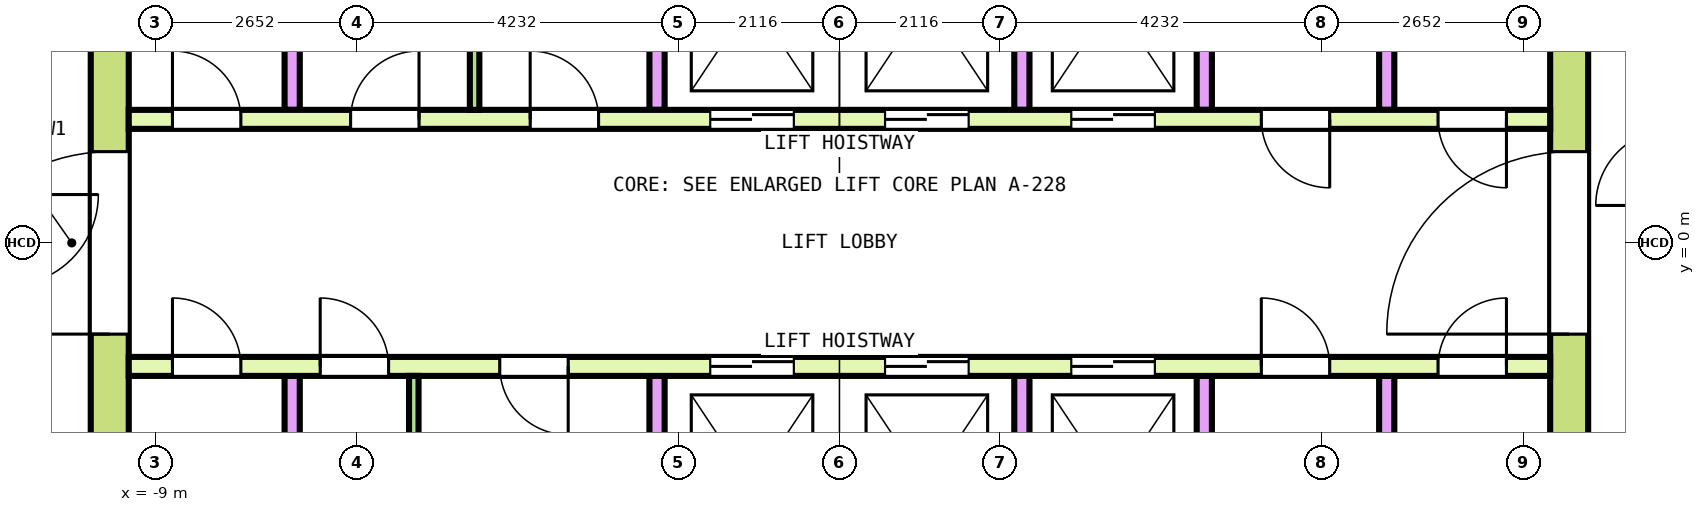
"""IFC4 building model, lengths in metres.
Left out: names, types, materials, properties, quantities, classifications, styles, units other than length and angle.
Written with IfcOpenShell. Run it as: python <this file> out.ifc"""

import sys

from ifc_helpers import new_model, si_unit, direction, frame, frame_2d, origin, place, context, subcontext, project, spatial, rectangle, extrude, element, fill, save


model = new_model("IFC4")
c1 = context("Model", 3, precision=1e-05, world=origin(), true_north=direction((0.0, 1.0)))
c2 = subcontext(c1, "Body", "Model", "MODEL_VIEW")
j1 = project(units=[si_unit("LENGTHUNIT", "METRE"), si_unit("PLANEANGLEUNIT", "RADIAN")], contexts=[c1])
p1 = place(None, origin())
s1 = spatial("IfcSite", under=j1, at=p1, CompositionType="ELEMENT")
p2 = place(p1, origin())
s2 = spatial("IfcBuilding", under=s1, at=p2, CompositionType="ELEMENT")
p3 = place(p2, frame((0.0, 0.0, 324.6)))
s3 = spatial("IfcBuildingStorey", under=s2, at=p3, CompositionType="ELEMENT", Elevation=324.6)
p4 = place(p3, frame((-9.6, -7.85, 0.0), z_axis=(0.0, 0.0, 1.0), x_axis=(0.0, 1.0, 0.0)))
e1 = element("IfcWall", 1, at=p4, inside=s3, PredefinedType="SHEAR", context=c2, shape_type="SweptSolid", body=[
    extrude(rectangle(XDim=15.7, YDim=0.5, at=frame_2d((7.85, 0.0))), origin(), (0.0, 0.0, 1.0), 3.7),
])
p5 = place(p4, frame((6.65, 0.0, 0.0)))
e2 = element("IfcOpeningElement", 2, at=p5, cuts=e1, PredefinedType="OPENING", context=c2, shape_type="SweptSolid", body=[
    extrude(rectangle(XDim=2.4, YDim=2.1, at=frame_2d((1.2, 1.05))), frame((0.0, 0.26, 0.0), z_axis=(0.0, -1.0, 0.0), x_axis=(1.0, 0.0, 0.0)), (0.0, 0.0, 1.0), 0.52),
])
p6 = place(p4, frame((13.55, 0.0, 0.0)))
e3 = element("IfcOpeningElement", 3, at=p6, cuts=e1, PredefinedType="OPENING", context=c2, shape_type="SweptSolid", body=[
    extrude(rectangle(XDim=1.2, YDim=2.1, at=frame_2d((0.6, 1.05))), frame((0.0, 0.26, 0.0), z_axis=(0.0, -1.0, 0.0), x_axis=(1.0, 0.0, 0.0)), (0.0, 0.0, 1.0), 0.52),
])
p7 = place(p4, frame((0.95, 0.0, 0.0)))
e4 = element("IfcOpeningElement", 4, at=p7, cuts=e1, PredefinedType="OPENING", context=c2, shape_type="SweptSolid", body=[
    extrude(rectangle(XDim=1.2, YDim=2.1, at=frame_2d((0.6, 1.05))), frame((0.0, 0.26, 0.0), z_axis=(0.0, -1.0, 0.0), x_axis=(1.0, 0.0, 0.0)), (0.0, 0.0, 1.0), 0.52),
])
p8 = place(p3, frame((9.6, -7.85, 0.0), z_axis=(0.0, 0.0, 1.0), x_axis=(0.0, 1.0, 0.0)))
e5 = element("IfcWall", 5, at=p8, inside=s3, PredefinedType="SHEAR", context=c2, shape_type="SweptSolid", body=[
    extrude(rectangle(XDim=15.7, YDim=0.5, at=frame_2d((7.85, 0.0))), origin(), (0.0, 0.0, 1.0), 3.7),
])
p9 = place(p8, frame((6.65, 0.0, 0.0)))
e6 = element("IfcOpeningElement", 6, at=p9, cuts=e5, PredefinedType="OPENING", context=c2, shape_type="SweptSolid", body=[
    extrude(rectangle(XDim=2.4, YDim=2.1, at=frame_2d((1.2, 1.05))), frame((0.0, 0.26, 0.0), z_axis=(0.0, -1.0, 0.0), x_axis=(1.0, 0.0, 0.0)), (0.0, 0.0, 1.0), 0.52),
])
p10 = place(p8, frame((13.55, 0.0, 0.0)))
e7 = element("IfcOpeningElement", 7, at=p10, cuts=e5, PredefinedType="OPENING", context=c2, shape_type="SweptSolid", body=[
    extrude(rectangle(XDim=1.2, YDim=2.1, at=frame_2d((0.6, 1.05))), frame((0.0, 0.26, 0.0), z_axis=(0.0, -1.0, 0.0), x_axis=(1.0, 0.0, 0.0)), (0.0, 0.0, 1.0), 0.52),
])
p11 = place(p8, frame((1.05, 0.0, 0.0)))
e8 = element("IfcOpeningElement", 8, at=p11, cuts=e5, PredefinedType="OPENING", context=c2, shape_type="SweptSolid", body=[
    extrude(rectangle(XDim=1.0, YDim=2.1, at=frame_2d((0.5, 1.05))), frame((0.0, 0.26, 0.0), z_axis=(0.0, -1.0, 0.0), x_axis=(1.0, 0.0, 0.0)), (0.0, 0.0, 1.0), 0.52),
])
p12 = place(p3, frame((-9.35, 1.625, 0.0), z_axis=(0.0, 0.0, 1.0), x_axis=(1.0, 0.0, 0.0)))
e9 = element("IfcWall", 9, at=p12, inside=s3, PredefinedType="SOLIDWALL", context=c2, shape_type="SweptSolid", body=[
    extrude(rectangle(XDim=18.7, YDim=0.25, at=frame_2d((9.35, 0.0))), origin(), (0.0, 0.0, 1.0), 3.7),
])
p13 = place(p12, frame((7.65, 0.0, 0.0)))
e10 = element("IfcOpeningElement", 10, at=p13, cuts=e9, PredefinedType="OPENING", context=c2, shape_type="SweptSolid", body=[
    extrude(rectangle(XDim=1.1, YDim=2.1, at=frame_2d((0.55, 1.05))), frame((0.0, 0.135, 0.0), z_axis=(0.0, -1.0, 0.0), x_axis=(1.0, 0.0, 0.0)), (0.0, 0.0, 1.0), 0.27),
])
p14 = place(p12, frame((9.95, 0.0, 0.0)))
e11 = element("IfcOpeningElement", 11, at=p14, cuts=e9, PredefinedType="OPENING", context=c2, shape_type="SweptSolid", body=[
    extrude(rectangle(XDim=1.1, YDim=2.1, at=frame_2d((0.55, 1.05))), frame((0.0, 0.135, 0.0), z_axis=(0.0, -1.0, 0.0), x_axis=(1.0, 0.0, 0.0)), (0.0, 0.0, 1.0), 0.27),
])
p15 = place(p12, frame((12.4, 0.0, 0.0)))
e12 = element("IfcOpeningElement", 12, at=p15, cuts=e9, PredefinedType="OPENING", context=c2, shape_type="SweptSolid", body=[
    extrude(rectangle(XDim=1.1, YDim=2.1, at=frame_2d((0.55, 1.05))), frame((0.0, 0.135, 0.0), z_axis=(0.0, -1.0, 0.0), x_axis=(1.0, 0.0, 0.0)), (0.0, 0.0, 1.0), 0.27),
])
p16 = place(p12, frame((0.575, 0.0, 0.0)))
e13 = element("IfcOpeningElement", 13, at=p16, cuts=e9, PredefinedType="OPENING", context=c2, shape_type="SweptSolid", body=[
    extrude(rectangle(XDim=0.9, YDim=2.1, at=frame_2d((0.45, 1.05))), frame((0.0, 0.135, 0.0), z_axis=(0.0, -1.0, 0.0), x_axis=(1.0, 0.0, 0.0)), (0.0, 0.0, 1.0), 0.27),
])
p17 = place(p12, frame((2.919, 0.0, 0.0)))
e14 = element("IfcOpeningElement", 14, at=p17, cuts=e9, PredefinedType="OPENING", context=c2, shape_type="SweptSolid", body=[
    extrude(rectangle(XDim=0.9, YDim=2.1, at=frame_2d((0.45, 1.05))), frame((0.0, 0.135, 0.0), z_axis=(0.0, -1.0, 0.0), x_axis=(1.0, 0.0, 0.0)), (0.0, 0.0, 1.0), 0.27),
])
p18 = place(p12, frame((5.281, 0.0, 0.0)))
e15 = element("IfcOpeningElement", 15, at=p18, cuts=e9, PredefinedType="OPENING", context=c2, shape_type="SweptSolid", body=[
    extrude(rectangle(XDim=0.9, YDim=2.1, at=frame_2d((0.45, 1.05))), frame((0.0, 0.135, 0.0), z_axis=(0.0, -1.0, 0.0), x_axis=(1.0, 0.0, 0.0)), (0.0, 0.0, 1.0), 0.27),
])
p19 = place(p12, frame((14.9, 0.0, 0.0)))
e16 = element("IfcOpeningElement", 16, at=p19, cuts=e9, PredefinedType="OPENING", context=c2, shape_type="SweptSolid", body=[
    extrude(rectangle(XDim=0.9, YDim=2.1, at=frame_2d((0.45, 1.05))), frame((0.0, 0.135, 0.0), z_axis=(0.0, -1.0, 0.0), x_axis=(1.0, 0.0, 0.0)), (0.0, 0.0, 1.0), 0.27),
])
p20 = place(p12, frame((17.225, 0.0, 0.0)))
e17 = element("IfcOpeningElement", 17, at=p20, cuts=e9, PredefinedType="OPENING", context=c2, shape_type="SweptSolid", body=[
    extrude(rectangle(XDim=0.9, YDim=2.1, at=frame_2d((0.45, 1.05))), frame((0.0, 0.135, 0.0), z_axis=(0.0, -1.0, 0.0), x_axis=(1.0, 0.0, 0.0)), (0.0, 0.0, 1.0), 0.27),
])
for number, where, z_axis, x_axis in (
    (18, (-7.2, 1.75, 0.0), (0.0, 0.0, 1.0), (0.0, 1.0, 0.0)),
    (19, (-2.4, 1.75, 0.0), (0.0, 0.0, 1.0), (0.0, 1.0, 0.0)),
    (20, (2.4, 1.75, 0.0), (0.0, 0.0, 1.0), (0.0, 1.0, 0.0)),
    (21, (4.8, 1.75, 0.0), (0.0, 0.0, 1.0), (0.0, 1.0, 0.0)),
    (22, (7.2, 1.75, 0.0), (0.0, 0.0, 1.0), (0.0, 1.0, 0.0)),
):
    element("IfcWall", number, at=place(p3, frame(where, z_axis=z_axis, x_axis=x_axis)), inside=s3, PredefinedType="SOLIDWALL", context=c2, shape_type="SweptSolid", body=[
        extrude(rectangle(XDim=2.9, YDim=0.2, at=frame_2d((1.45, 0.0))), origin(), (0.0, 0.0, 1.0), 3.7),
    ])
p21 = place(p3, frame((-9.35, -1.625, 0.0), z_axis=(0.0, 0.0, 1.0), x_axis=(1.0, 0.0, 0.0)))
e23 = element("IfcWall", 23, at=p21, inside=s3, PredefinedType="SOLIDWALL", context=c2, shape_type="SweptSolid", body=[
    extrude(rectangle(XDim=18.7, YDim=0.25, at=frame_2d((9.35, 0.0))), origin(), (0.0, 0.0, 1.0), 3.7),
])
p22 = place(p21, frame((7.65, 0.0, 0.0)))
e24 = element("IfcOpeningElement", 24, at=p22, cuts=e23, PredefinedType="OPENING", context=c2, shape_type="SweptSolid", body=[
    extrude(rectangle(XDim=1.1, YDim=2.1, at=frame_2d((0.55, 1.05))), frame((0.0, 0.135, 0.0), z_axis=(0.0, -1.0, 0.0), x_axis=(1.0, 0.0, 0.0)), (0.0, 0.0, 1.0), 0.27),
])
p23 = place(p21, frame((9.95, 0.0, 0.0)))
e25 = element("IfcOpeningElement", 25, at=p23, cuts=e23, PredefinedType="OPENING", context=c2, shape_type="SweptSolid", body=[
    extrude(rectangle(XDim=1.1, YDim=2.1, at=frame_2d((0.55, 1.05))), frame((0.0, 0.135, 0.0), z_axis=(0.0, -1.0, 0.0), x_axis=(1.0, 0.0, 0.0)), (0.0, 0.0, 1.0), 0.27),
])
p24 = place(p21, frame((12.4, 0.0, 0.0)))
e26 = element("IfcOpeningElement", 26, at=p24, cuts=e23, PredefinedType="OPENING", context=c2, shape_type="SweptSolid", body=[
    extrude(rectangle(XDim=1.1, YDim=2.1, at=frame_2d((0.55, 1.05))), frame((0.0, 0.135, 0.0), z_axis=(0.0, -1.0, 0.0), x_axis=(1.0, 0.0, 0.0)), (0.0, 0.0, 1.0), 0.27),
])
p25 = place(p21, frame((0.575, 0.0, 0.0)))
e27 = element("IfcOpeningElement", 27, at=p25, cuts=e23, PredefinedType="OPENING", context=c2, shape_type="SweptSolid", body=[
    extrude(rectangle(XDim=0.9, YDim=2.1, at=frame_2d((0.45, 1.05))), frame((0.0, 0.135, 0.0), z_axis=(0.0, -1.0, 0.0), x_axis=(1.0, 0.0, 0.0)), (0.0, 0.0, 1.0), 0.27),
])
p26 = place(p21, frame((2.519, 0.0, 0.0)))
e28 = element("IfcOpeningElement", 28, at=p26, cuts=e23, PredefinedType="OPENING", context=c2, shape_type="SweptSolid", body=[
    extrude(rectangle(XDim=0.9, YDim=2.1, at=frame_2d((0.45, 1.05))), frame((0.0, 0.135, 0.0), z_axis=(0.0, -1.0, 0.0), x_axis=(1.0, 0.0, 0.0)), (0.0, 0.0, 1.0), 0.27),
])
p27 = place(p21, frame((4.881, 0.0, 0.0)))
e29 = element("IfcOpeningElement", 29, at=p27, cuts=e23, PredefinedType="OPENING", context=c2, shape_type="SweptSolid", body=[
    extrude(rectangle(XDim=0.9, YDim=2.1, at=frame_2d((0.45, 1.05))), frame((0.0, 0.135, 0.0), z_axis=(0.0, -1.0, 0.0), x_axis=(1.0, 0.0, 0.0)), (0.0, 0.0, 1.0), 0.27),
])
p28 = place(p21, frame((14.9, 0.0, 0.0)))
e30 = element("IfcOpeningElement", 30, at=p28, cuts=e23, PredefinedType="OPENING", context=c2, shape_type="SweptSolid", body=[
    extrude(rectangle(XDim=0.9, YDim=2.1, at=frame_2d((0.45, 1.05))), frame((0.0, 0.135, 0.0), z_axis=(0.0, -1.0, 0.0), x_axis=(1.0, 0.0, 0.0)), (0.0, 0.0, 1.0), 0.27),
])
p29 = place(p21, frame((17.225, 0.0, 0.0)))
e31 = element("IfcOpeningElement", 31, at=p29, cuts=e23, PredefinedType="OPENING", context=c2, shape_type="SweptSolid", body=[
    extrude(rectangle(XDim=0.9, YDim=2.1, at=frame_2d((0.45, 1.05))), frame((0.0, 0.135, 0.0), z_axis=(0.0, -1.0, 0.0), x_axis=(1.0, 0.0, 0.0)), (0.0, 0.0, 1.0), 0.27),
])
for number, where, z_axis, x_axis in (
    (32, (-7.2, -4.65, 0.0), (0.0, 0.0, 1.0), (0.0, 1.0, 0.0)),
    (33, (-2.4, -4.65, 0.0), (0.0, 0.0, 1.0), (0.0, 1.0, 0.0)),
    (34, (2.4, -4.65, 0.0), (0.0, 0.0, 1.0), (0.0, 1.0, 0.0)),
    (35, (4.8, -4.65, 0.0), (0.0, 0.0, 1.0), (0.0, 1.0, 0.0)),
    (36, (7.2, -4.65, 0.0), (0.0, 0.0, 1.0), (0.0, 1.0, 0.0)),
):
    element("IfcWall", number, at=place(p3, frame(where, z_axis=z_axis, x_axis=x_axis)), inside=s3, PredefinedType="SOLIDWALL", context=c2, shape_type="SweptSolid", body=[
        extrude(rectangle(XDim=2.9, YDim=0.2, at=frame_2d((1.45, 0.0))), origin(), (0.0, 0.0, 1.0), 3.7),
    ])
for number, where, z_axis, x_axis in (
    (37, (-4.8, 1.75, 0.0), (0.0, 0.0, 1.0), (0.0, 1.0, 0.0)),
    (38, (-5.6, -4.65, 0.0), (0.0, 0.0, 1.0), (0.0, 1.0, 0.0)),
):
    element("IfcWall", number, at=place(p3, frame(where, z_axis=z_axis, x_axis=x_axis)), inside=s3, PredefinedType="PARTITIONING", context=c2, shape_type="SweptSolid", body=[
        extrude(rectangle(XDim=2.9, YDim=0.125, at=frame_2d((1.45, 0.0))), origin(), (0.0, 0.0, 1.0), 3.7),
    ])
p30 = place(p13, origin())
e39 = element("IfcDoor", 39, at=p30, inside=s3, OperationType="DOUBLE_DOOR_SLIDING", PredefinedType="DOOR", context=c2, shape_type="SweptSolid", body=[
    extrude(rectangle(XDim=1.1, YDim=2.1, at=frame_2d((0.55, 1.05))), frame((0.0, 0.075, 0.0), z_axis=(0.0, -1.0, 0.0), x_axis=(1.0, 0.0, 0.0)), (0.0, 0.0, 1.0), 0.15),
])
fill(e10, e39)
p31 = place(p14, origin())
e40 = element("IfcDoor", 40, at=p31, inside=s3, OperationType="DOUBLE_DOOR_SLIDING", PredefinedType="DOOR", context=c2, shape_type="SweptSolid", body=[
    extrude(rectangle(XDim=1.1, YDim=2.1, at=frame_2d((0.55, 1.05))), frame((0.0, 0.075, 0.0), z_axis=(0.0, -1.0, 0.0), x_axis=(1.0, 0.0, 0.0)), (0.0, 0.0, 1.0), 0.15),
])
fill(e11, e40)
p32 = place(p15, origin())
e41 = element("IfcDoor", 41, at=p32, inside=s3, OperationType="DOUBLE_DOOR_SLIDING", PredefinedType="DOOR", context=c2, shape_type="SweptSolid", body=[
    extrude(rectangle(XDim=1.1, YDim=2.1, at=frame_2d((0.55, 1.05))), frame((0.0, 0.075, 0.0), z_axis=(0.0, -1.0, 0.0), x_axis=(1.0, 0.0, 0.0)), (0.0, 0.0, 1.0), 0.15),
])
fill(e12, e41)
p33 = place(p22, origin())
e42 = element("IfcDoor", 42, at=p33, inside=s3, OperationType="DOUBLE_DOOR_SLIDING", PredefinedType="DOOR", context=c2, shape_type="SweptSolid", body=[
    extrude(rectangle(XDim=1.1, YDim=2.1, at=frame_2d((0.55, 1.05))), frame((0.0, 0.075, 0.0), z_axis=(0.0, -1.0, 0.0), x_axis=(1.0, 0.0, 0.0)), (0.0, 0.0, 1.0), 0.15),
])
fill(e24, e42)
p34 = place(p23, origin())
e43 = element("IfcDoor", 43, at=p34, inside=s3, OperationType="DOUBLE_DOOR_SLIDING", PredefinedType="DOOR", context=c2, shape_type="SweptSolid", body=[
    extrude(rectangle(XDim=1.1, YDim=2.1, at=frame_2d((0.55, 1.05))), frame((0.0, 0.075, 0.0), z_axis=(0.0, -1.0, 0.0), x_axis=(1.0, 0.0, 0.0)), (0.0, 0.0, 1.0), 0.15),
])
fill(e25, e43)
p35 = place(p24, origin())
e44 = element("IfcDoor", 44, at=p35, inside=s3, OperationType="DOUBLE_DOOR_SLIDING", PredefinedType="DOOR", context=c2, shape_type="SweptSolid", body=[
    extrude(rectangle(XDim=1.1, YDim=2.1, at=frame_2d((0.55, 1.05))), frame((0.0, 0.075, 0.0), z_axis=(0.0, -1.0, 0.0), x_axis=(1.0, 0.0, 0.0)), (0.0, 0.0, 1.0), 0.15),
])
fill(e26, e44)
p36 = place(p5, origin())
e45 = element("IfcDoor", 45, at=p36, inside=s3, OperationType="DOUBLE_DOOR_SINGLE_SWING", PredefinedType="DOOR", context=c2, shape_type="SweptSolid", body=[
    extrude(rectangle(XDim=2.4, YDim=2.1, at=frame_2d((1.2, 1.05))), frame((0.0, 0.2, 0.0), z_axis=(0.0, -1.0, 0.0), x_axis=(1.0, 0.0, 0.0)), (0.0, 0.0, 1.0), 0.4),
])
fill(e2, e45)
p37 = place(p9, origin())
e46 = element("IfcDoor", 46, at=p37, inside=s3, OperationType="DOUBLE_DOOR_SINGLE_SWING", PredefinedType="DOOR", context=c2, shape_type="SweptSolid", body=[
    extrude(rectangle(XDim=2.4, YDim=2.1, at=frame_2d((1.2, 1.05))), frame((0.0, 0.2, 0.0), z_axis=(0.0, -1.0, 0.0), x_axis=(1.0, 0.0, 0.0)), (0.0, 0.0, 1.0), 0.4),
])
fill(e6, e46)
p38 = place(p16, origin())
e47 = element("IfcDoor", 47, at=p38, inside=s3, OperationType="SINGLE_SWING_RIGHT", PredefinedType="DOOR", context=c2, shape_type="SweptSolid", body=[
    extrude(rectangle(XDim=0.9, YDim=2.1, at=frame_2d((0.45, 1.05))), frame((0.0, 0.075, 0.0), z_axis=(0.0, -1.0, 0.0), x_axis=(1.0, 0.0, 0.0)), (0.0, 0.0, 1.0), 0.15),
])
fill(e13, e47)
p39 = place(p17, origin())
e48 = element("IfcDoor", 48, at=p39, inside=s3, OperationType="SINGLE_SWING_LEFT", PredefinedType="DOOR", context=c2, shape_type="SweptSolid", body=[
    extrude(rectangle(XDim=0.9, YDim=2.1, at=frame_2d((0.45, 1.05))), frame((0.0, 0.075, 0.0), z_axis=(0.0, -1.0, 0.0), x_axis=(1.0, 0.0, 0.0)), (0.0, 0.0, 1.0), 0.15),
])
fill(e14, e48)
p40 = place(p18, origin())
e49 = element("IfcDoor", 49, at=p40, inside=s3, OperationType="SINGLE_SWING_RIGHT", PredefinedType="DOOR", context=c2, shape_type="SweptSolid", body=[
    extrude(rectangle(XDim=0.9, YDim=2.1, at=frame_2d((0.45, 1.05))), frame((0.0, 0.075, 0.0), z_axis=(0.0, -1.0, 0.0), x_axis=(1.0, 0.0, 0.0)), (0.0, 0.0, 1.0), 0.15),
])
fill(e15, e49)
p41 = place(p19, origin())
e50 = element("IfcDoor", 50, at=p41, inside=s3, OperationType="SINGLE_SWING_LEFT", PredefinedType="DOOR", context=c2, shape_type="SweptSolid", body=[
    extrude(rectangle(XDim=0.9, YDim=2.1, at=frame_2d((0.45, 1.05))), frame((0.0, 0.075, 0.0), z_axis=(0.0, -1.0, 0.0), x_axis=(1.0, 0.0, 0.0)), (0.0, 0.0, 1.0), 0.15),
])
fill(e16, e50)
p42 = place(p20, origin())
e51 = element("IfcDoor", 51, at=p42, inside=s3, OperationType="SINGLE_SWING_RIGHT", PredefinedType="DOOR", context=c2, shape_type="SweptSolid", body=[
    extrude(rectangle(XDim=0.9, YDim=2.1, at=frame_2d((0.45, 1.05))), frame((0.0, 0.075, 0.0), z_axis=(0.0, -1.0, 0.0), x_axis=(1.0, 0.0, 0.0)), (0.0, 0.0, 1.0), 0.15),
])
fill(e17, e51)
p43 = place(p25, origin())
e52 = element("IfcDoor", 52, at=p43, inside=s3, OperationType="SINGLE_SWING_LEFT", PredefinedType="DOOR", context=c2, shape_type="SweptSolid", body=[
    extrude(rectangle(XDim=0.9, YDim=2.1, at=frame_2d((0.45, 1.05))), frame((0.0, 0.075, 0.0), z_axis=(0.0, -1.0, 0.0), x_axis=(1.0, 0.0, 0.0)), (0.0, 0.0, 1.0), 0.15),
])
fill(e27, e52)
p44 = place(p26, origin())
e53 = element("IfcDoor", 53, at=p44, inside=s3, OperationType="SINGLE_SWING_RIGHT", PredefinedType="DOOR", context=c2, shape_type="SweptSolid", body=[
    extrude(rectangle(XDim=0.9, YDim=2.1, at=frame_2d((0.45, 1.05))), frame((0.0, 0.075, 0.0), z_axis=(0.0, -1.0, 0.0), x_axis=(1.0, 0.0, 0.0)), (0.0, 0.0, 1.0), 0.15),
])
fill(e28, e53)
p45 = place(p27, origin())
e54 = element("IfcDoor", 54, at=p45, inside=s3, OperationType="SINGLE_SWING_LEFT", PredefinedType="DOOR", context=c2, shape_type="SweptSolid", body=[
    extrude(rectangle(XDim=0.9, YDim=2.1, at=frame_2d((0.45, 1.05))), frame((0.0, 0.075, 0.0), z_axis=(0.0, -1.0, 0.0), x_axis=(1.0, 0.0, 0.0)), (0.0, 0.0, 1.0), 0.15),
])
fill(e29, e54)
p46 = place(p28, origin())
e55 = element("IfcDoor", 55, at=p46, inside=s3, OperationType="SINGLE_SWING_RIGHT", PredefinedType="DOOR", context=c2, shape_type="SweptSolid", body=[
    extrude(rectangle(XDim=0.9, YDim=2.1, at=frame_2d((0.45, 1.05))), frame((0.0, 0.075, 0.0), z_axis=(0.0, -1.0, 0.0), x_axis=(1.0, 0.0, 0.0)), (0.0, 0.0, 1.0), 0.15),
])
fill(e30, e55)
p47 = place(p29, origin())
e56 = element("IfcDoor", 56, at=p47, inside=s3, OperationType="SINGLE_SWING_LEFT", PredefinedType="DOOR", context=c2, shape_type="SweptSolid", body=[
    extrude(rectangle(XDim=0.9, YDim=2.1, at=frame_2d((0.45, 1.05))), frame((0.0, 0.075, 0.0), z_axis=(0.0, -1.0, 0.0), x_axis=(1.0, 0.0, 0.0)), (0.0, 0.0, 1.0), 0.15),
])
fill(e31, e56)
save(model, sys.argv[1])
